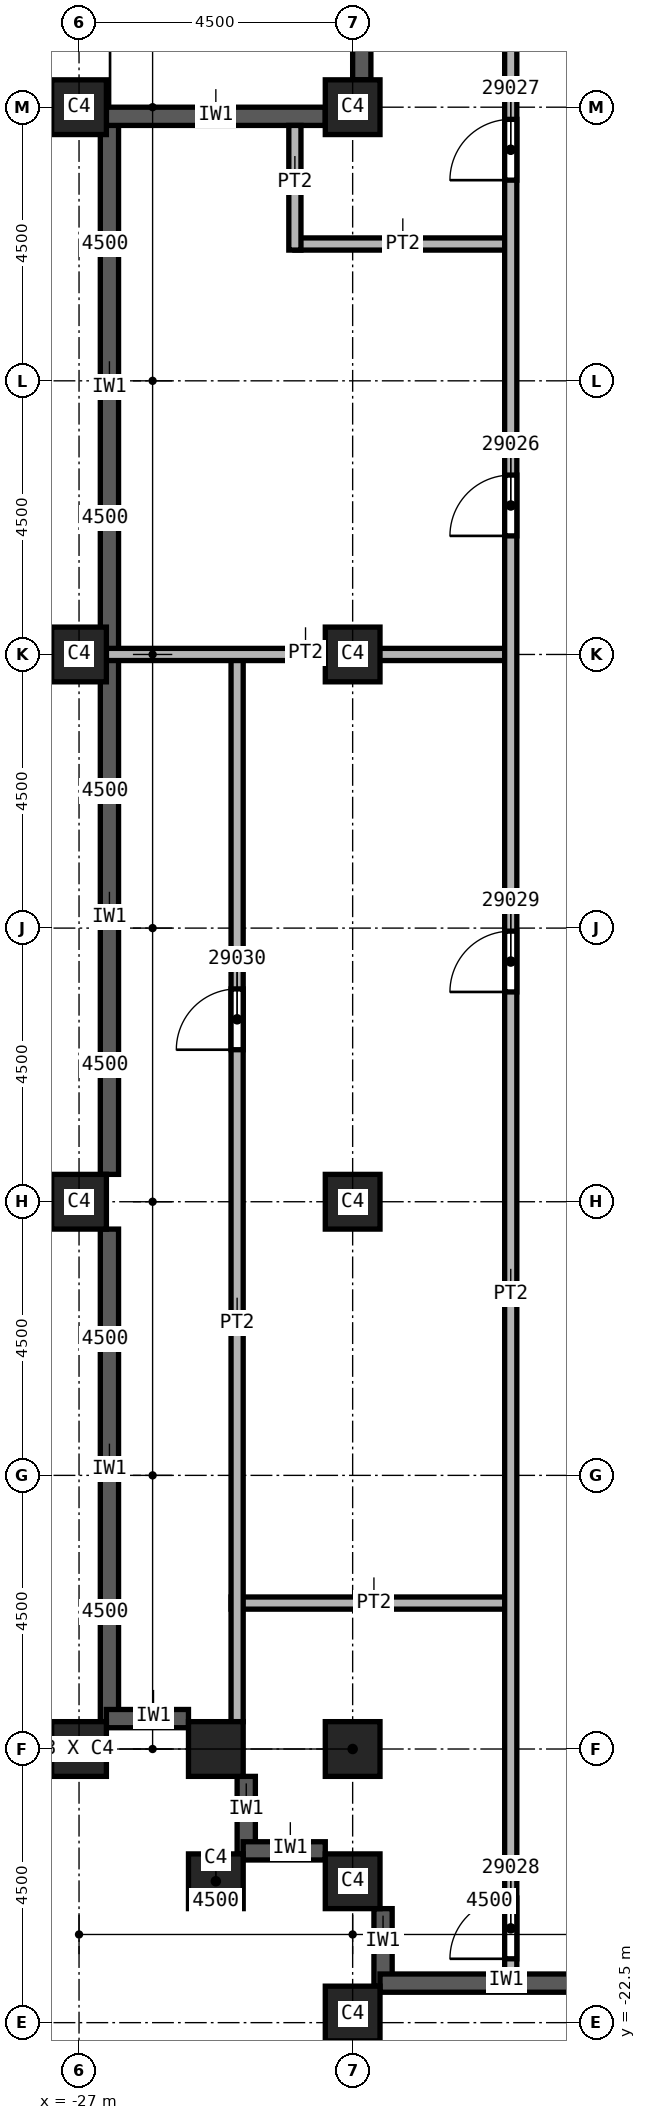
"""IFC4 building model, lengths in metres.
Left out: names, types, materials, properties, quantities, classifications, styles, units other than length and angle.
Written with IfcOpenShell. Run it as: python <this file> out.ifc"""

import sys

from ifc_helpers import new_model, si_unit, direction, frame, frame_2d, origin, origin_2d, place, context, subcontext, project, spatial, rectangle, extrude, element, fill, save


model = new_model("IFC4")
c1 = context("Model", 3, precision=1e-05, world=origin(), true_north=direction((0.0, 1.0)))
c2 = subcontext(c1, "Body", "Model", "MODEL_VIEW")
j1 = project(units=[si_unit("LENGTHUNIT", "METRE"), si_unit("PLANEANGLEUNIT", "RADIAN")], contexts=[c1])
p1 = place(None, origin())
s1 = spatial("IfcSite", under=j1, at=p1, CompositionType="ELEMENT")
p2 = place(p1, origin())
s2 = spatial("IfcBuilding", under=s1, at=p2, CompositionType="ELEMENT")
p3 = place(p2, frame((0.0, 0.0, 294.0)))
s3 = spatial("IfcBuildingStorey", under=s2, at=p3, CompositionType="ELEMENT", Elevation=294.0)
for number, where, z_axis, x_axis in (
    (1, (-22.5, 0.0, 0.0), (0.0, 0.0, 1.0), (1.0, 0.0, 0.0)),
    (2, (-22.5, 9.0, 0.0), (0.0, 0.0, 1.0), (1.0, 0.0, 0.0)),
    (3, (-22.5, -9.0, 0.0), (0.0, 0.0, 1.0), (1.0, 0.0, 0.0)),
    (4, (-22.5, -18.0, 0.0), (0.0, 0.0, 1.0), (1.0, 0.0, 0.0)),
):
    element("IfcColumn", number, at=place(p3, frame(where, z_axis=z_axis, x_axis=x_axis)), inside=s3, PredefinedType="COLUMN", context=c2, shape_type="SweptSolid", body=[
        extrude(rectangle(XDim=0.9, YDim=0.9, at=origin_2d()), origin(), (0.0, 0.0, 1.0), 5.74),
    ])
p4 = place(p3, frame((-22.5, -22.35, 0.0), z_axis=(0.0, -0.179908897505, 0.983683276567), x_axis=(1.0, 0.0, 0.0)))
e5 = element("IfcColumn", 5, at=p4, inside=s3, PredefinedType="COLUMN", context=c2, shape_type="SweptSolid", body=[
    extrude(rectangle(XDim=0.9, YDim=0.9, at=origin_2d()), origin(), (0.0, 0.0, 1.0), 5.835),
])
for number, where, z_axis, x_axis in (
    (6, (-27.0, 0.0, 0.0), (0.0, 0.0, 1.0), (0.0, 1.0, 0.0)),
    (7, (-27.0, 9.0, 0.0), (0.0, 0.0, 1.0), (0.0, 1.0, 0.0)),
    (8, (-27.0, -9.0, 0.0), (0.0, 0.0, 1.0), (0.0, 1.0, 0.0)),
    (9, (-27.0, -18.0, 0.0), (0.0, 0.0, 1.0), (0.0, 1.0, 0.0)),
):
    element("IfcColumn", number, at=place(p3, frame(where, z_axis=z_axis, x_axis=x_axis)), inside=s3, PredefinedType="COLUMN", context=c2, shape_type="SweptSolid", body=[
        extrude(rectangle(XDim=0.9, YDim=0.9, at=origin_2d()), origin(), (0.0, 0.0, 1.0), 5.74),
    ])
for number, where, z_axis, x_axis in (
    (10, (-22.5, -20.175, 0.0), (0.0, -0.091, 0.996), (1.0, 0.0, 0.0)),
    (11, (-24.75, -20.175, 0.0), (0.0, -0.091, 0.996), (1.0, 0.0, 0.0)),
):
    element("IfcColumn", number, at=place(p3, frame(where, z_axis=z_axis, x_axis=x_axis)), inside=s3, PredefinedType="COLUMN", context=c2, shape_type="SweptSolid", body=[
        extrude(rectangle(XDim=0.9, YDim=0.9, at=origin_2d()), origin(), (0.0, 0.0, 1.0), 5.764),
    ])
p5 = place(p3, frame((-24.75, -18.0, 0.0), z_axis=(0.0, 0.0, 1.0), x_axis=(1.0, 0.0, 0.0)))
e12 = element("IfcColumn", 12, at=p5, inside=s3, PredefinedType="COLUMN", context=c2, shape_type="SweptSolid", body=[
    extrude(rectangle(XDim=0.9, YDim=0.9, at=origin_2d()), origin(), (0.0, 0.0, 1.0), 5.74),
])
p6 = place(p3, frame((-26.5, 8.75, 0.0), z_axis=(0.0, 0.0, 1.0), x_axis=(0.0, -1.0, 0.0)))
e13 = element("IfcWall", 13, at=p6, inside=s3, PredefinedType="SOLIDWALL", context=c2, shape_type="SweptSolid", body=[
    extrude(rectangle(XDim=8.7, YDim=0.3, at=frame_2d((4.35, 0.0))), origin(), (0.0, 0.0, 1.0), 5.14),
])
p7 = place(p3, frame((-26.5, -0.05, 0.0), z_axis=(0.0, 0.0, 1.0), x_axis=(0.0, -1.0, 0.0)))
e14 = element("IfcWall", 14, at=p7, inside=s3, PredefinedType="SOLIDWALL", context=c2, shape_type="SweptSolid", body=[
    extrude(rectangle(XDim=8.5, YDim=0.3, at=frame_2d((4.25, 0.0))), origin(), (0.0, 0.0, 1.0), 5.14),
])
p8 = place(p3, frame((-26.5, -9.45, 0.0), z_axis=(0.0, 0.0, 1.0), x_axis=(0.0, -1.0, 0.0)))
e15 = element("IfcWall", 15, at=p8, inside=s3, PredefinedType="SOLIDWALL", context=c2, shape_type="SweptSolid", body=[
    extrude(rectangle(XDim=8.1, YDim=0.3, at=frame_2d((4.05, 0.0))), origin(), (0.0, 0.0, 1.0), 5.14),
])
p9 = place(p3, frame((-26.55, -17.5, 0.0), z_axis=(0.0, 0.0, 1.0), x_axis=(1.0, 0.0, 0.0)))
e16 = element("IfcWall", 16, at=p9, inside=s3, PredefinedType="SOLIDWALL", context=c2, shape_type="SweptSolid", body=[
    extrude(rectangle(XDim=1.35, YDim=0.3, at=frame_2d((0.675, 0.0))), origin(), (0.0, 0.0, 1.0), 5.14),
])
p10 = place(p3, frame((-24.25, -18.45, 0.0), z_axis=(0.0, 0.0, 1.0), x_axis=(0.0, -1.0, 0.0)))
e17 = element("IfcWall", 17, at=p10, inside=s3, PredefinedType="SOLIDWALL", context=c2, shape_type="SweptSolid", body=[
    extrude(rectangle(XDim=1.275, YDim=0.3, at=frame_2d((0.638, 0.0))), origin(), (0.0, 0.0, 1.0), 5.14),
])
p11 = place(p3, frame((-24.3, -19.675, 0.0), z_axis=(0.0, 0.0, 1.0), x_axis=(1.0, 0.0, 0.0)))
e18 = element("IfcWall", 18, at=p11, inside=s3, PredefinedType="SOLIDWALL", context=c2, shape_type="SweptSolid", body=[
    extrude(rectangle(XDim=1.35, YDim=0.3, at=frame_2d((0.675, 0.0))), origin(), (0.0, 0.0, 1.0), 5.14),
])
p12 = place(p3, frame((-22.0, -20.625, 0.0), z_axis=(0.0, 0.0, 1.0), x_axis=(0.0, -1.0, 0.0)))
e19 = element("IfcWall", 19, at=p12, inside=s3, PredefinedType="SOLIDWALL", context=c2, shape_type="SweptSolid", body=[
    extrude(rectangle(XDim=1.275, YDim=0.3, at=frame_2d((0.637, 0.0))), origin(), (0.0, 0.0, 1.0), 5.14),
])
p13 = place(p3, frame((-22.05, -21.85, 0.0), z_axis=(0.0, 0.0, 1.0), x_axis=(1.0, 0.0, 0.0)))
e20 = element("IfcWall", 20, at=p13, inside=s3, PredefinedType="SOLIDWALL", context=c2, shape_type="SweptSolid", body=[
    extrude(rectangle(XDim=4.0, YDim=0.3, at=frame_2d((2.0, 0.0))), origin(), (0.0, 0.0, 1.0), 5.14),
])
p14 = place(p3, frame((-22.35, 9.45, 0.0), z_axis=(0.0, 0.0, 1.0), x_axis=(0.0, 1.0, 0.0)))
e21 = element("IfcWall", 21, at=p14, inside=s3, PredefinedType="SOLIDWALL", context=c2, shape_type="SweptSolid", body=[
    extrude(rectangle(XDim=8.1, YDim=0.3, at=frame_2d((4.05, 0.0))), origin(), (0.0, 0.0, 1.0), 5.14),
])
p15 = place(p14, frame((3.45, 0.0, 0.0)))
e22 = element("IfcOpeningElement", 22, at=p15, cuts=e21, PredefinedType="OPENING", context=c2, shape_type="SweptSolid", body=[
    extrude(rectangle(XDim=1.2, YDim=2.4, at=frame_2d((0.6, 1.2))), frame((0.0, 0.15, 0.0), z_axis=(0.0, -1.0, 0.0), x_axis=(1.0, 0.0, 0.0)), (0.0, 0.0, 1.0), 0.3),
])
p16 = place(p3, frame((-22.95, 8.85, 0.0), z_axis=(0.0, 0.0, 1.0), x_axis=(-1.0, 0.0, 0.0)))
e23 = element("IfcWall", 23, at=p16, inside=s3, PredefinedType="SOLIDWALL", context=c2, shape_type="SweptSolid", body=[
    extrude(rectangle(XDim=3.6, YDim=0.3, at=frame_2d((1.8, 0.0))), origin(), (0.0, 0.0, 1.0), 5.14),
])
p17 = place(p3, frame((-24.5, -15.6, 0.0), z_axis=(0.0, 0.0, 1.0), x_axis=(1.0, 0.0, 0.0)))
e24 = element("IfcWall", 24, at=p17, inside=s3, PredefinedType="PARTITIONING", context=c2, shape_type="SweptSolid", body=[
    extrude(rectangle(XDim=4.6, YDim=0.2, at=frame_2d((2.3, 0.0))), origin(), (0.0, 0.0, 1.0), 5.74),
])
p18 = place(p3, frame((-24.4, -17.55, 0.0), z_axis=(0.0, 0.0, 1.0), x_axis=(0.0, 1.0, 0.0)))
e25 = element("IfcWall", 25, at=p18, inside=s3, PredefinedType="PARTITIONING", context=c2, shape_type="SweptSolid", body=[
    extrude(rectangle(XDim=17.55, YDim=0.2, at=frame_2d((8.775, 0.0))), origin(), (0.0, 0.0, 1.0), 5.74),
])
p19 = place(p18, frame((11.05, 0.0, 0.0)))
e26 = element("IfcOpeningElement", 26, at=p19, cuts=e25, PredefinedType="OPENING", context=c2, shape_type="SweptSolid", body=[
    extrude(rectangle(XDim=1.0, YDim=2.1, at=frame_2d((0.5, 1.05))), frame((0.0, 0.1, 0.0), z_axis=(0.0, -1.0, 0.0), x_axis=(1.0, 0.0, 0.0)), (0.0, 0.0, 1.0), 0.2),
])
p20 = place(p3, frame((-19.9, 0.0, 0.0), z_axis=(0.0, 0.0, 1.0), x_axis=(-1.0, 0.0, 0.0)))
e27 = element("IfcWall", 27, at=p20, inside=s3, PredefinedType="PARTITIONING", context=c2, shape_type="SweptSolid", body=[
    extrude(rectangle(XDim=6.65, YDim=0.2, at=frame_2d((3.325, 0.0))), origin(), (0.0, 0.0, 1.0), 5.74),
])
p21 = place(p3, frame((-23.45, 6.75, 0.0), z_axis=(0.0, 0.0, 1.0), x_axis=(1.0, 0.0, 0.0)))
e28 = element("IfcWall", 28, at=p21, inside=s3, PredefinedType="PARTITIONING", context=c2, shape_type="SweptSolid", body=[
    extrude(rectangle(XDim=3.55, YDim=0.2, at=frame_2d((1.775, 0.0))), origin(), (0.0, 0.0, 1.0), 5.74),
])
p22 = place(p3, frame((-23.45, 8.7, 0.0), z_axis=(0.0, 0.0, 1.0), x_axis=(0.0, -1.0, 0.0)))
e29 = element("IfcWall", 29, at=p22, inside=s3, PredefinedType="PARTITIONING", context=c2, shape_type="SweptSolid", body=[
    extrude(rectangle(XDim=2.05, YDim=0.2, at=frame_2d((1.025, 0.0))), origin(), (0.0, 0.0, 1.0), 5.74),
])
p23 = place(p3, frame((-19.9, -21.7, 0.0), z_axis=(0.0, 0.0, 1.0), x_axis=(0.0, 1.0, 0.0)))
e30 = element("IfcWall", 30, at=p23, inside=s3, PredefinedType="PARTITIONING", context=c2, shape_type="SweptSolid", body=[
    extrude(rectangle(XDim=35.3, YDim=0.2, at=frame_2d((17.65, 0.0))), origin(), (0.0, 0.0, 1.0), 5.74),
])
p24 = place(p23, frame((23.65, 0.0, 0.0)))
e31 = element("IfcOpeningElement", 31, at=p24, cuts=e30, PredefinedType="OPENING", context=c2, shape_type="SweptSolid", body=[
    extrude(rectangle(XDim=1.0, YDim=2.1, at=frame_2d((0.5, 1.05))), frame((0.0, 0.1, 0.0), z_axis=(0.0, -1.0, 0.0), x_axis=(1.0, 0.0, 0.0)), (0.0, 0.0, 1.0), 0.2),
])
p25 = place(p23, frame((29.5, 0.0, 0.0)))
e32 = element("IfcOpeningElement", 32, at=p25, cuts=e30, PredefinedType="OPENING", context=c2, shape_type="SweptSolid", body=[
    extrude(rectangle(XDim=1.0, YDim=2.1, at=frame_2d((0.5, 1.05))), frame((0.0, 0.1, 0.0), z_axis=(0.0, -1.0, 0.0), x_axis=(1.0, 0.0, 0.0)), (0.0, 0.0, 1.0), 0.2),
])
p26 = place(p23, frame((0.25, 0.0, 0.0)))
e33 = element("IfcOpeningElement", 33, at=p26, cuts=e30, PredefinedType="OPENING", context=c2, shape_type="SweptSolid", body=[
    extrude(rectangle(XDim=1.0, YDim=2.1, at=frame_2d((0.5, 1.05))), frame((0.0, 0.1, 0.0), z_axis=(0.0, -1.0, 0.0), x_axis=(1.0, 0.0, 0.0)), (0.0, 0.0, 1.0), 0.2),
])
p27 = place(p23, frame((16.15, 0.0, 0.0)))
e34 = element("IfcOpeningElement", 34, at=p27, cuts=e30, PredefinedType="OPENING", context=c2, shape_type="SweptSolid", body=[
    extrude(rectangle(XDim=1.0, YDim=2.1, at=frame_2d((0.5, 1.05))), frame((0.0, 0.1, 0.0), z_axis=(0.0, -1.0, 0.0), x_axis=(1.0, 0.0, 0.0)), (0.0, 0.0, 1.0), 0.2),
])
p28 = place(p24, origin())
e35 = element("IfcDoor", 35, at=p28, inside=s3, OperationType="SINGLE_SWING_LEFT", PredefinedType="DOOR", context=c2, shape_type="SweptSolid", body=[
    extrude(rectangle(XDim=1.0, YDim=2.1, at=frame_2d((0.5, 1.05))), frame((0.0, 0.025, 0.0), z_axis=(0.0, -1.0, 0.0), x_axis=(1.0, 0.0, 0.0)), (0.0, 0.0, 1.0), 0.05),
])
fill(e31, e35)
p29 = place(p25, origin())
e36 = element("IfcDoor", 36, at=p29, inside=s3, OperationType="SINGLE_SWING_RIGHT", PredefinedType="DOOR", context=c2, shape_type="SweptSolid", body=[
    extrude(rectangle(XDim=1.0, YDim=2.1, at=frame_2d((0.5, 1.05))), frame((0.0, 0.025, 0.0), z_axis=(0.0, -1.0, 0.0), x_axis=(1.0, 0.0, 0.0)), (0.0, 0.0, 1.0), 0.05),
])
fill(e32, e36)
p30 = place(p26, origin())
e37 = element("IfcDoor", 37, at=p30, inside=s3, OperationType="SINGLE_SWING_LEFT", PredefinedType="DOOR", context=c2, shape_type="SweptSolid", body=[
    extrude(rectangle(XDim=1.0, YDim=2.1, at=frame_2d((0.5, 1.05))), frame((0.0, 0.025, 0.0), z_axis=(0.0, -1.0, 0.0), x_axis=(1.0, 0.0, 0.0)), (0.0, 0.0, 1.0), 0.05),
])
fill(e33, e37)
p31 = place(p27, origin())
e38 = element("IfcDoor", 38, at=p31, inside=s3, OperationType="SINGLE_SWING_RIGHT", PredefinedType="DOOR", context=c2, shape_type="SweptSolid", body=[
    extrude(rectangle(XDim=1.0, YDim=2.1, at=frame_2d((0.5, 1.05))), frame((0.0, 0.025, 0.0), z_axis=(0.0, -1.0, 0.0), x_axis=(1.0, 0.0, 0.0)), (0.0, 0.0, 1.0), 0.05),
])
fill(e34, e38)
p32 = place(p19, origin())
e39 = element("IfcDoor", 39, at=p32, inside=s3, OperationType="SINGLE_SWING_LEFT", PredefinedType="DOOR", context=c2, shape_type="SweptSolid", body=[
    extrude(rectangle(XDim=1.0, YDim=2.1, at=frame_2d((0.5, 1.05))), frame((0.0, 0.025, 0.0), z_axis=(0.0, -1.0, 0.0), x_axis=(1.0, 0.0, 0.0)), (0.0, 0.0, 1.0), 0.05),
])
fill(e26, e39)
save(model, sys.argv[1])
